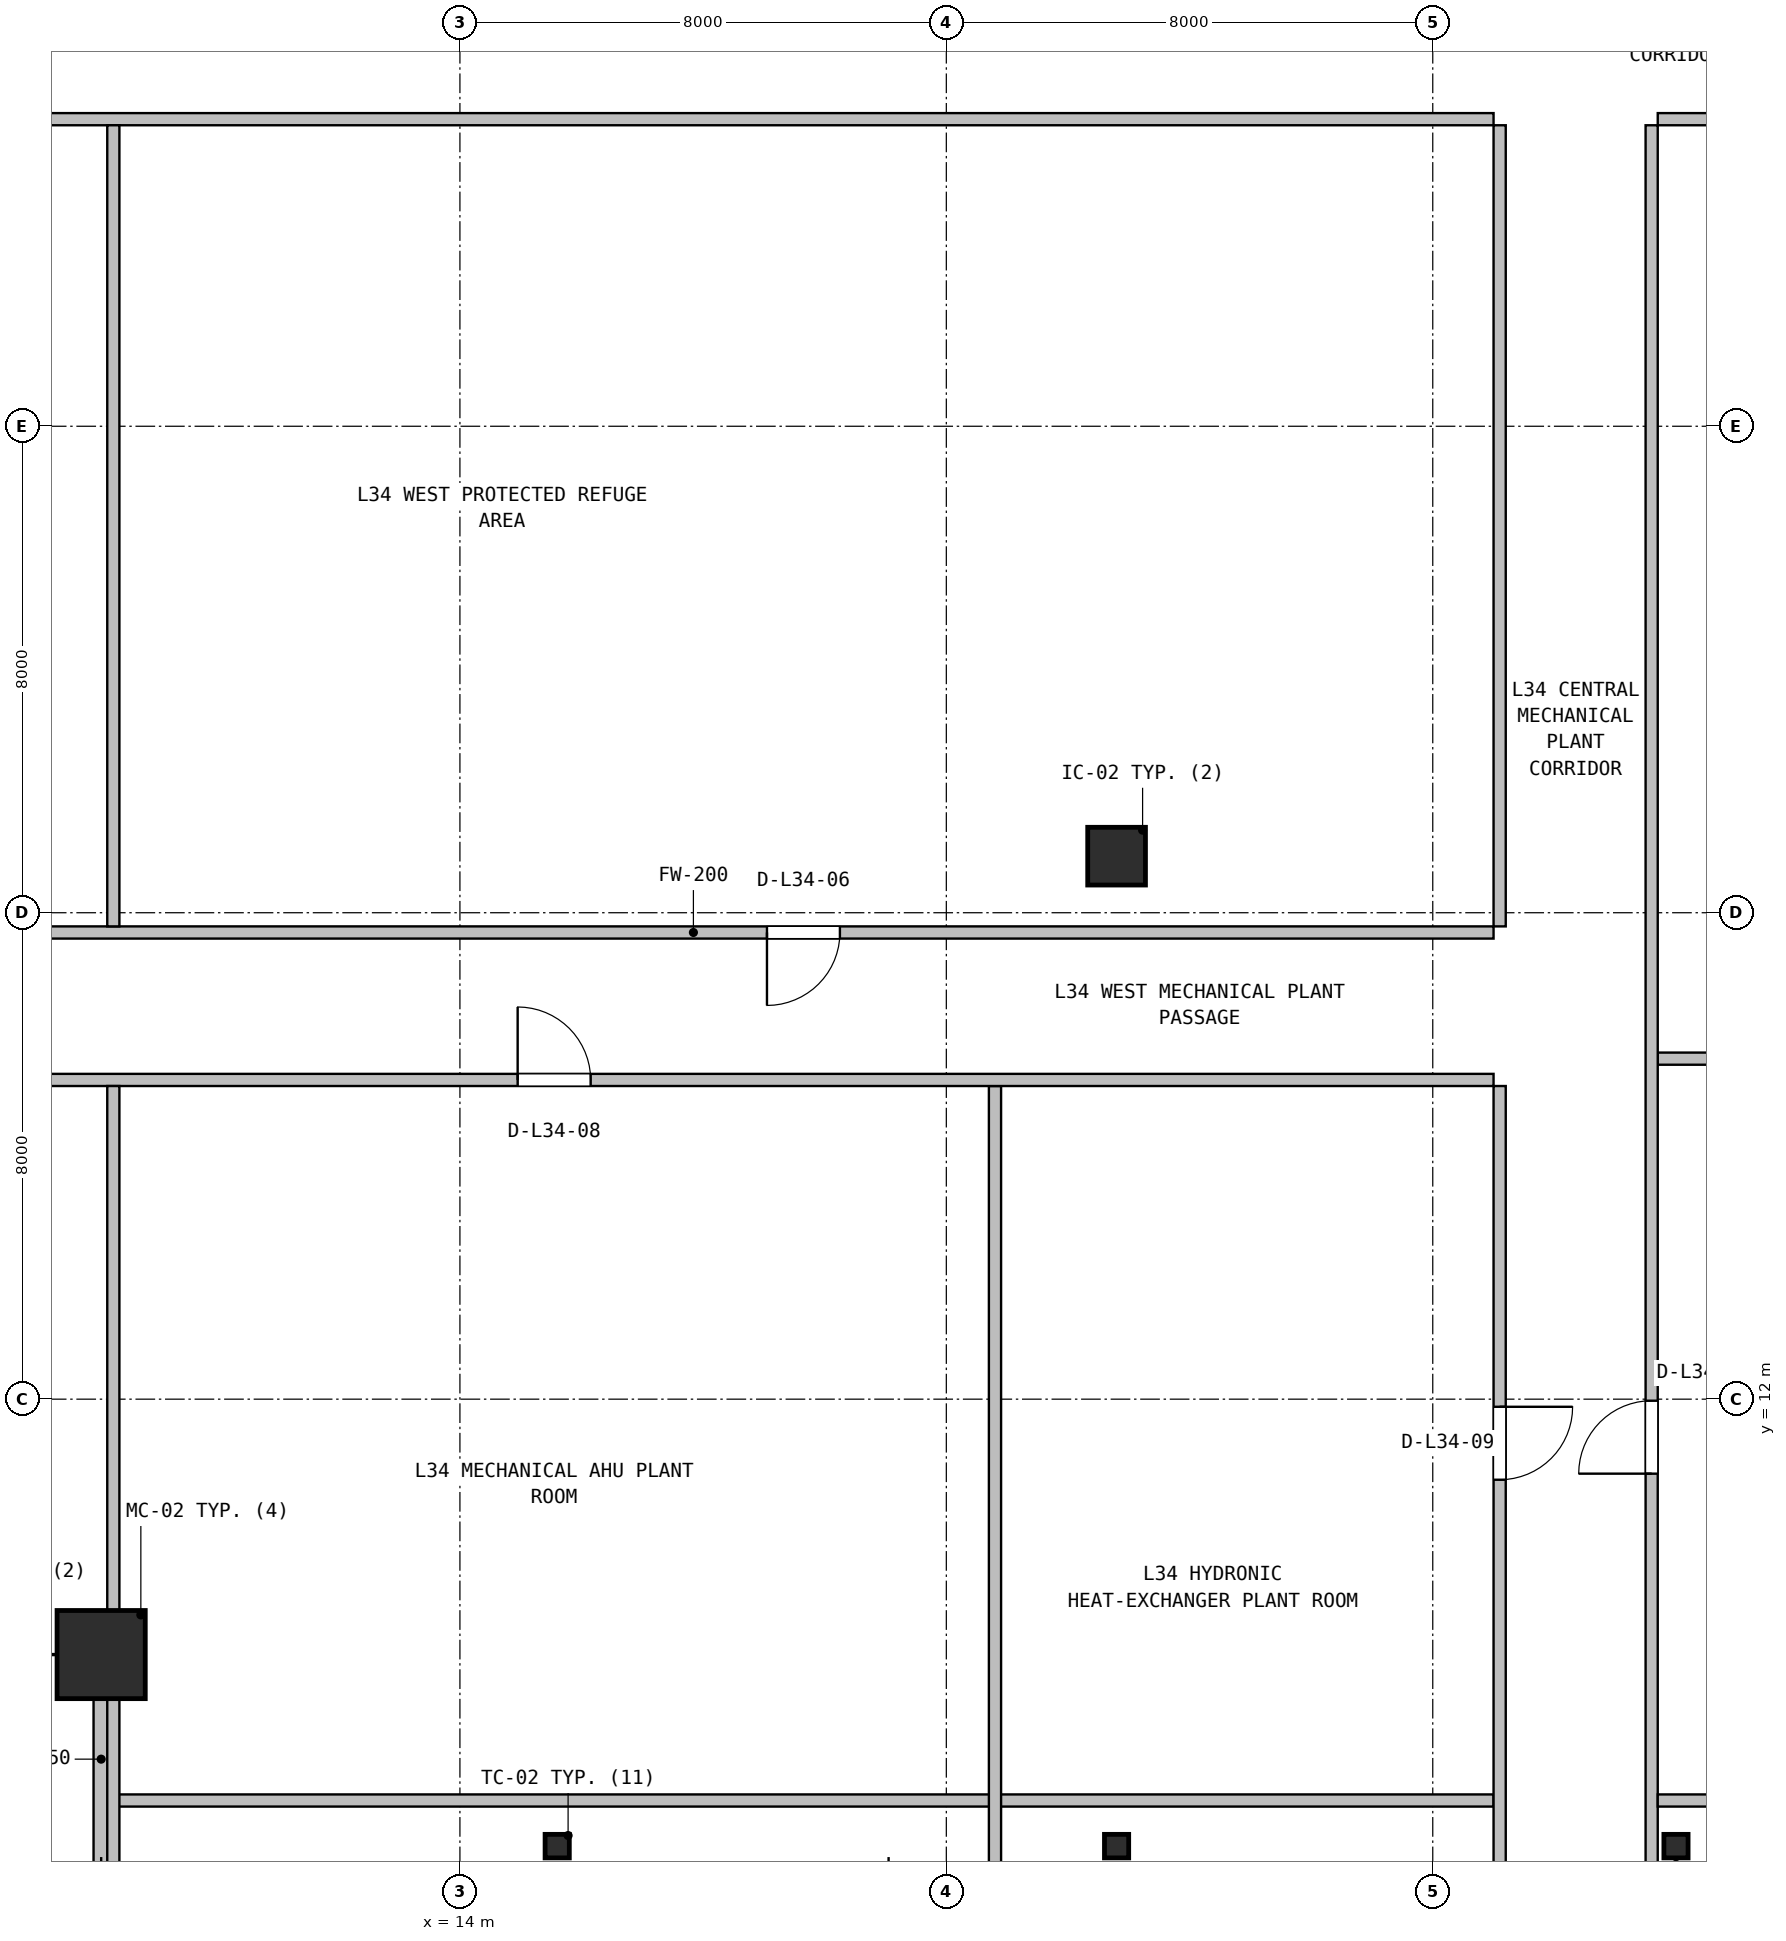
"""IFC4 building model, lengths in metres.
Left out: names, types, materials, properties, quantities, classifications, styles, units other than length and angle.
Written with IfcOpenShell. Run it as: python <this file> out.ifc"""

import sys

from ifc_helpers import new_model, si_unit, direction, frame, frame_2d, origin, origin_2d, place, context, subcontext, project, spatial, rectangle, hollow_rectangle, i_section, extrude, source, transform, mapped, element, fill, save


model = new_model("IFC4")
c1 = context("Model", 3, precision=1e-05, world=origin(), true_north=direction((0.0, 1.0)))
c2 = subcontext(c1, "Body", "Model", "MODEL_VIEW")
j1 = project(units=[si_unit("LENGTHUNIT", "METRE"), si_unit("PLANEANGLEUNIT", "RADIAN")], contexts=[c1])
p1 = place(None, origin())
s1 = spatial("IfcSite", under=j1, at=p1, CompositionType="ELEMENT")
p2 = place(p1, origin())
s2 = spatial("IfcBuilding", under=s1, at=p2, CompositionType="ELEMENT")
p3 = place(p2, frame((0.0, 0.0, 141.0)))
s3 = spatial("IfcBuildingStorey", under=s2, at=p3, CompositionType="ELEMENT", Elevation=141.0)
m1 = source(origin(), c2, "Body", "SweptSolid", [
    extrude(hollow_rectangle(XDim=1.45, YDim=1.45, WallThickness=0.055, at=origin_2d()), origin(), (0.0, 0.0, 1.0), 4.8),
])
p4 = place(p3, frame((8.1, 7.8, 0.0), z_axis=(0.0, 0.0, 1.0), x_axis=(1.0, 0.0, 0.0)))
e1 = element("IfcColumn", 1, at=p4, inside=s3, PredefinedType="COLUMN", context=c2, shape_type="MappedRepresentation", body=[
    mapped(m1, transform((0.0, 0.0, 0.0), x_axis=(1.0, 0.0, 0.0), y_axis=(0.0, 1.0, 0.0), z_axis=(0.0, 0.0, 1.0), scale=1.0)),
])
m2 = source(origin(), c2, "Body", "SweptSolid", [
    extrude(i_section(OverallWidth=0.398, OverallDepth=0.387, WebThickness=0.021, FlangeThickness=0.033, FilletRadius=0.018, at=origin_2d()), origin(), (0.0, 0.0, 1.0), 4.8),
])
for number, where, z_axis, x_axis in (
    (2, (15.6, 4.65, 0.0), (0.0, 0.0, 1.0), (1.0, 0.0, 0.0)),
    (3, (24.8, 4.65, 0.0), (0.0, 0.0, 1.0), (1.0, 0.0, 0.0)),
    (4, (34.0, 4.65, 0.0), (0.0, 0.0, 1.0), (1.0, 0.0, 0.0)),
):
    element("IfcColumn", number, at=place(p3, frame(where, z_axis=z_axis, x_axis=x_axis)), inside=s3, PredefinedType="COLUMN", context=c2, shape_type="MappedRepresentation", body=[
        mapped(m2, transform((0.0, 0.0, 0.0), x_axis=(1.0, 0.0, 0.0), y_axis=(0.0, 1.0, 0.0), z_axis=(0.0, 0.0, 1.0), scale=1.0)),
    ])
m3 = source(origin(), c2, "Body", "SweptSolid", [
    extrude(rectangle(XDim=0.95, YDim=0.95, at=origin_2d()), origin(), (0.0, 0.0, 1.0), 4.8),
])
p5 = place(p3, frame((24.8, 20.93, 0.0), z_axis=(0.0, 0.0, 1.0), x_axis=(1.0, 0.0, 0.0)))
e5 = element("IfcColumn", 5, at=p5, inside=s3, PredefinedType="COLUMN", context=c2, shape_type="MappedRepresentation", body=[
    mapped(m3, transform((0.0, 0.0, 0.0), x_axis=(1.0, 0.0, 0.0), y_axis=(0.0, 1.0, 0.0), z_axis=(0.0, 0.0, 1.0), scale=1.0)),
])
p6 = place(p3, frame((8.1, 4.28, 0.0), z_axis=(0.0, 0.0, 1.0), x_axis=(0.0, 1.0, 0.0)))
e6 = element("IfcWall", 6, at=p6, inside=s3, PredefinedType="SOLIDWALL", context=c2, shape_type="SweptSolid", body=[
    extrude(rectangle(XDim=3.6, YDim=0.25, at=frame_2d((1.8, 0.0))), origin(), (0.0, 0.0, 1.0), 2.925),
])
p7 = place(p3, frame((4.68, 19.675, 0.0), z_axis=(0.0, 0.0, 1.0), x_axis=(1.0, 0.0, 0.0)))
e7 = element("IfcWall", 7, at=p7, inside=s3, PredefinedType="SOLIDWALL", context=c2, shape_type="SweptSolid", body=[
    extrude(rectangle(XDim=26.32, YDim=0.2, at=frame_2d((13.16, 0.0))), origin(), (0.0, 0.0, 1.0), 2.925),
])
p8 = place(p7, frame((14.37, 0.0, 0.0)))
e8 = element("IfcOpeningElement", 8, at=p8, cuts=e7, PredefinedType="OPENING", context=c2, shape_type="SweptSolid", body=[
    extrude(rectangle(XDim=1.2, YDim=2.1, at=frame_2d((0.6, 1.05))), frame((0.0, 0.11, 0.0), z_axis=(0.0, -1.0, 0.0), x_axis=(1.0, 0.0, 0.0)), (0.0, 0.0, 1.0), 0.22),
])
p9 = place(p3, frame((31.1, 19.775, 0.0), z_axis=(0.0, 0.0, 1.0), x_axis=(0.0, 1.0, 0.0)))
e9 = element("IfcWall", 9, at=p9, inside=s3, PredefinedType="SOLIDWALL", context=c2, shape_type="SweptSolid", body=[
    extrude(rectangle(XDim=13.175, YDim=0.2, at=frame_2d((6.587, 0.0))), origin(), (0.0, 0.0, 1.0), 2.925),
])
p10 = place(p3, frame((4.68, 33.05, 0.0), z_axis=(0.0, 0.0, 1.0), x_axis=(1.0, 0.0, 0.0)))
e10 = element("IfcWall", 10, at=p10, inside=s3, PredefinedType="SOLIDWALL", context=c2, shape_type="SweptSolid", body=[
    extrude(rectangle(XDim=26.32, YDim=0.2, at=frame_2d((13.16, 0.0))), origin(), (0.0, 0.0, 1.0), 2.925),
])
p11 = place(p3, frame((8.3, 19.775, 0.0), z_axis=(0.0, 0.0, 1.0), x_axis=(0.0, 1.0, 0.0)))
e11 = element("IfcWall", 11, at=p11, inside=s3, PredefinedType="SOLIDWALL", context=c2, shape_type="SweptSolid", body=[
    extrude(rectangle(XDim=13.175, YDim=0.2, at=frame_2d((6.587, 0.0))), origin(), (0.0, 0.0, 1.0), 2.925),
])
p12 = place(p3, frame((33.7, 17.6, 0.0), z_axis=(0.0, 0.0, 1.0), x_axis=(1.0, 0.0, 0.0)))
e12 = element("IfcWall", 12, at=p12, inside=s3, PredefinedType="SOLIDWALL", context=c2, shape_type="SweptSolid", body=[
    extrude(rectangle(XDim=29.62, YDim=0.2, at=frame_2d((14.81, 0.0))), origin(), (0.0, 0.0, 1.0), 2.925),
])
p13 = place(p3, frame((33.7, 33.05, 0.0), z_axis=(0.0, 0.0, 1.0), x_axis=(1.0, 0.0, 0.0)))
e13 = element("IfcWall", 13, at=p13, inside=s3, PredefinedType="SOLIDWALL", context=c2, shape_type="SweptSolid", body=[
    extrude(rectangle(XDim=29.62, YDim=0.2, at=frame_2d((14.81, 0.0))), origin(), (0.0, 0.0, 1.0), 2.925),
])
p14 = place(p13, frame((8.65, 0.0, 0.0)))
e14 = element("IfcOpeningElement", 14, at=p14, cuts=e13, PredefinedType="OPENING", context=c2, shape_type="SweptSolid", body=[
    extrude(rectangle(XDim=1.2, YDim=2.1, at=frame_2d((0.6, 1.05))), frame((0.0, 0.11, 0.0), z_axis=(0.0, -1.0, 0.0), x_axis=(1.0, 0.0, 0.0)), (0.0, 0.0, 1.0), 0.22),
])
p15 = place(p3, frame((33.6, 4.38, 0.0), z_axis=(0.0, 0.0, 1.0), x_axis=(0.0, 1.0, 0.0)))
e15 = element("IfcWall", 15, at=p15, inside=s3, PredefinedType="SOLIDWALL", context=c2, shape_type="SweptSolid", body=[
    extrude(rectangle(XDim=28.57, YDim=0.2, at=frame_2d((14.285, 0.0))), origin(), (0.0, 0.0, 1.0), 2.925),
])
p16 = place(p15, frame((6.395, 0.0, 0.0)))
e16 = element("IfcOpeningElement", 16, at=p16, cuts=e15, PredefinedType="OPENING", context=c2, shape_type="SweptSolid", body=[
    extrude(rectangle(XDim=1.2, YDim=2.1, at=frame_2d((0.6, 1.05))), frame((0.0, 0.11, 0.0), z_axis=(0.0, -1.0, 0.0), x_axis=(1.0, 0.0, 0.0)), (0.0, 0.0, 1.0), 0.22),
])
p17 = place(p3, frame((8.22, 5.4, 0.0), z_axis=(0.0, 0.0, 1.0), x_axis=(1.0, 0.0, 0.0)))
e17 = element("IfcWall", 17, at=p17, inside=s3, PredefinedType="SOLIDWALL", context=c2, shape_type="SweptSolid", body=[
    extrude(rectangle(XDim=22.78, YDim=0.2, at=frame_2d((11.39, 0.0))), origin(), (0.0, 0.0, 1.0), 2.925),
])
p18 = place(p3, frame((22.8, 4.38, 0.0), z_axis=(0.0, 0.0, 1.0), x_axis=(0.0, 1.0, 0.0)))
e18 = element("IfcWall", 18, at=p18, inside=s3, PredefinedType="SOLIDWALL", context=c2, shape_type="SweptSolid", body=[
    extrude(rectangle(XDim=12.77, YDim=0.2, at=frame_2d((6.385, 0.0))), origin(), (0.0, 0.0, 1.0), 2.925),
])
p19 = place(p3, frame((4.68, 17.25, 0.0), z_axis=(0.0, 0.0, 1.0), x_axis=(1.0, 0.0, 0.0)))
e19 = element("IfcWall", 19, at=p19, inside=s3, PredefinedType="SOLIDWALL", context=c2, shape_type="SweptSolid", body=[
    extrude(rectangle(XDim=26.32, YDim=0.2, at=frame_2d((13.16, 0.0))), origin(), (0.0, 0.0, 1.0), 2.925),
])
p20 = place(p19, frame((10.27, 0.0, 0.0)))
e20 = element("IfcOpeningElement", 20, at=p20, cuts=e19, PredefinedType="OPENING", context=c2, shape_type="SweptSolid", body=[
    extrude(rectangle(XDim=1.2, YDim=2.1, at=frame_2d((0.6, 1.05))), frame((0.0, 0.11, 0.0), z_axis=(0.0, -1.0, 0.0), x_axis=(1.0, 0.0, 0.0)), (0.0, 0.0, 1.0), 0.22),
])
p21 = place(p3, frame((8.3, 4.38, 0.0), z_axis=(0.0, 0.0, 1.0), x_axis=(0.0, 1.0, 0.0)))
e21 = element("IfcWall", 21, at=p21, inside=s3, PredefinedType="SOLIDWALL", context=c2, shape_type="SweptSolid", body=[
    extrude(rectangle(XDim=12.77, YDim=0.2, at=frame_2d((6.385, 0.0))), origin(), (0.0, 0.0, 1.0), 2.925),
])
p22 = place(p3, frame((31.1, 4.38, 0.0), z_axis=(0.0, 0.0, 1.0), x_axis=(0.0, 1.0, 0.0)))
e22 = element("IfcWall", 22, at=p22, inside=s3, PredefinedType="SOLIDWALL", context=c2, shape_type="SweptSolid", body=[
    extrude(rectangle(XDim=12.77, YDim=0.2, at=frame_2d((6.385, 0.0))), origin(), (0.0, 0.0, 1.0), 2.925),
])
p23 = place(p22, frame((6.295, 0.0, 0.0)))
e23 = element("IfcOpeningElement", 23, at=p23, cuts=e22, PredefinedType="OPENING", context=c2, shape_type="SweptSolid", body=[
    extrude(rectangle(XDim=1.2, YDim=2.1, at=frame_2d((0.6, 1.05))), frame((0.0, 0.11, 0.0), z_axis=(0.0, -1.0, 0.0), x_axis=(1.0, 0.0, 0.0)), (0.0, 0.0, 1.0), 0.22),
])
p24 = place(p3, frame((33.7, 5.4, 0.0), z_axis=(0.0, 0.0, 1.0), x_axis=(1.0, 0.0, 0.0)))
e24 = element("IfcWall", 24, at=p24, inside=s3, PredefinedType="SOLIDWALL", context=c2, shape_type="SweptSolid", body=[
    extrude(rectangle(XDim=26.08, YDim=0.2, at=frame_2d((13.04, 0.0))), origin(), (0.0, 0.0, 1.0), 2.925),
])
m4 = source(origin(), c2, "Body", "SweptSolid", [
    extrude(rectangle(XDim=1.2, YDim=2.1, at=frame_2d((0.6, 1.05))), frame((0.0, 0.025, 0.0), z_axis=(0.0, -1.0, 0.0), x_axis=(1.0, 0.0, 0.0)), (0.0, 0.0, 1.0), 0.05),
])
p25 = place(p8, frame((1.2, 0.0, 0.0), z_axis=(0.0, 0.0, 1.0), x_axis=(-1.0, 0.0, 0.0)))
e25 = element("IfcDoor", 25, at=p25, inside=s3, OperationType="SINGLE_SWING_LEFT", PredefinedType="DOOR", context=c2, shape_type="MappedRepresentation", body=[
    mapped(m4, transform((0.0, 0.0, 0.0), x_axis=(1.0, 0.0, 0.0), y_axis=(0.0, 1.0, 0.0), z_axis=(0.0, 0.0, 1.0), scale=1.0)),
])
fill(e8, e25)
p26 = place(p20, origin())
e26 = element("IfcDoor", 26, at=p26, inside=s3, OperationType="SINGLE_SWING_LEFT", PredefinedType="DOOR", context=c2, shape_type="MappedRepresentation", body=[
    mapped(m4, transform((0.0, 0.0, 0.0), x_axis=(1.0, 0.0, 0.0), y_axis=(0.0, 1.0, 0.0), z_axis=(0.0, 0.0, 1.0), scale=1.0)),
])
fill(e20, e26)
p27 = place(p23, frame((1.2, 0.0, 0.0), z_axis=(0.0, 0.0, 1.0), x_axis=(-1.0, 0.0, 0.0)))
e27 = element("IfcDoor", 27, at=p27, inside=s3, OperationType="SINGLE_SWING_RIGHT", PredefinedType="DOOR", context=c2, shape_type="MappedRepresentation", body=[
    mapped(m4, transform((0.0, 0.0, 0.0), x_axis=(1.0, 0.0, 0.0), y_axis=(0.0, 1.0, 0.0), z_axis=(0.0, 0.0, 1.0), scale=1.0)),
])
fill(e23, e27)
p28 = place(p16, origin())
e28 = element("IfcDoor", 28, at=p28, inside=s3, OperationType="SINGLE_SWING_LEFT", PredefinedType="DOOR", context=c2, shape_type="MappedRepresentation", body=[
    mapped(m4, transform((0.0, 0.0, 0.0), x_axis=(1.0, 0.0, 0.0), y_axis=(0.0, 1.0, 0.0), z_axis=(0.0, 0.0, 1.0), scale=1.0)),
])
fill(e16, e28)
save(model, sys.argv[1])
